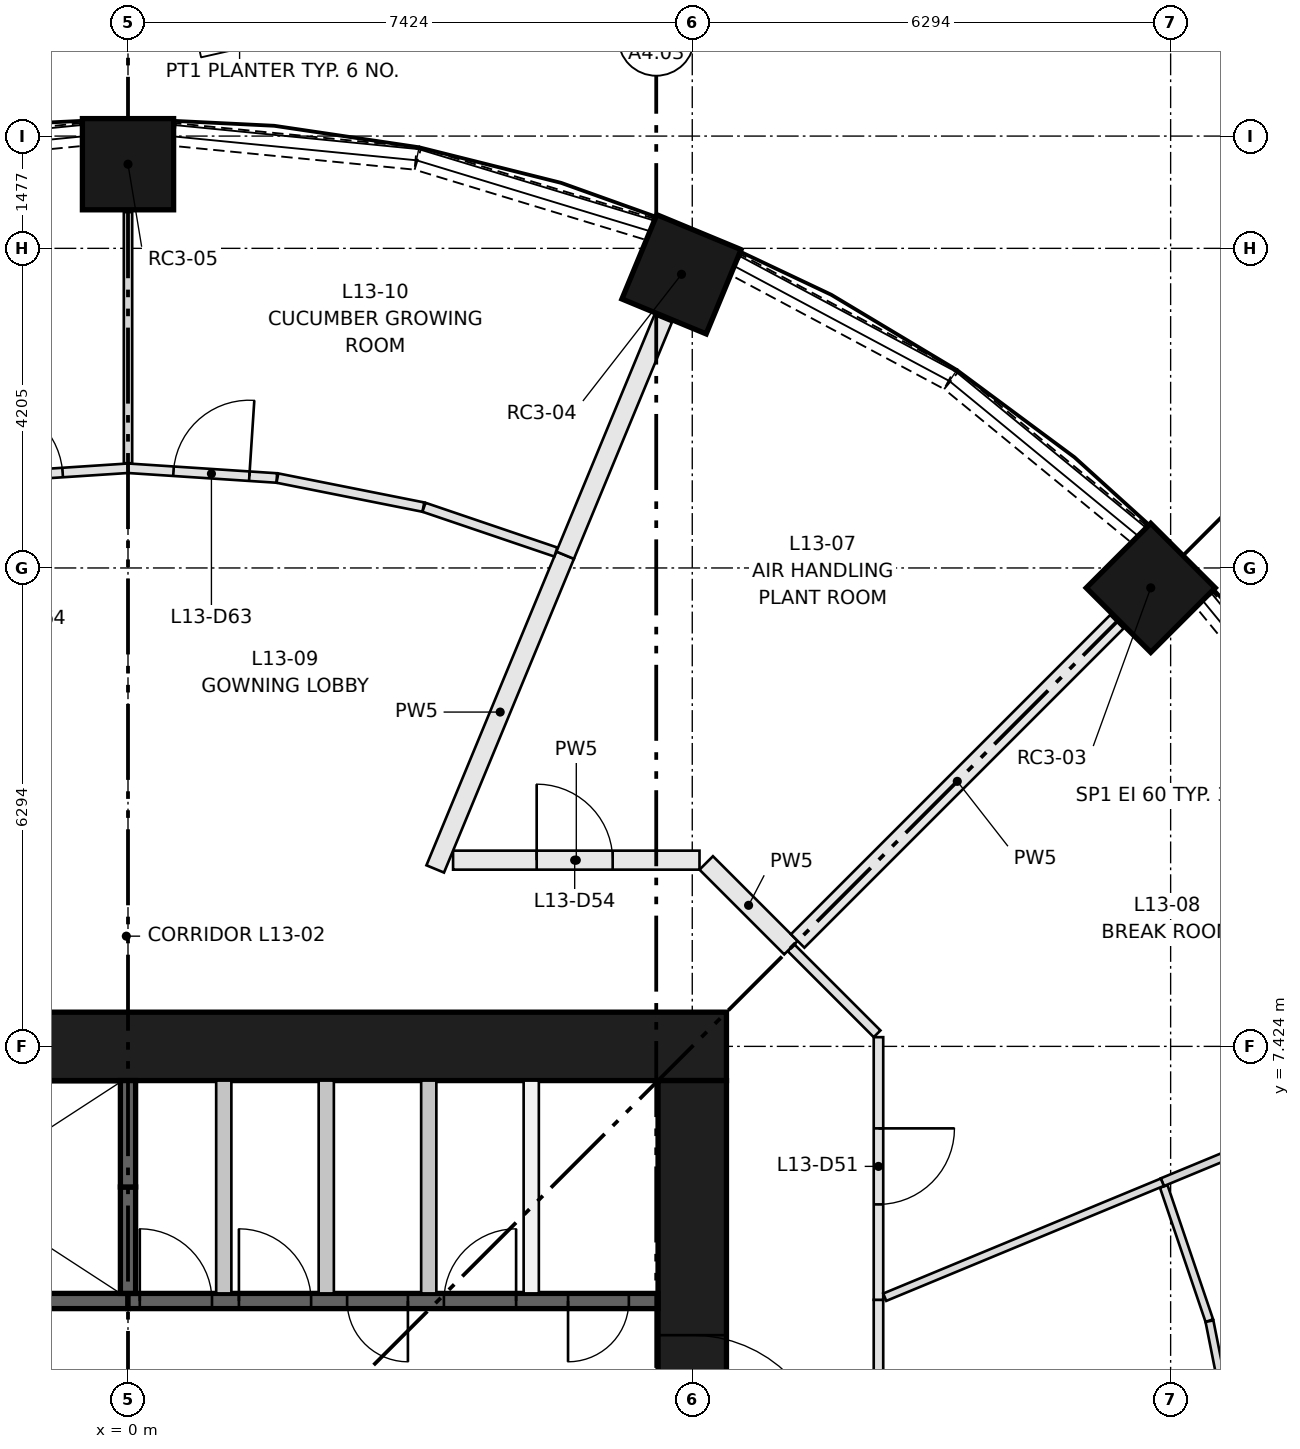
"""IFC4 building model, lengths in metres.
Left out: names, types, materials, properties, quantities, classifications, styles, units other than length and angle.
Written with IfcOpenShell. Run it as: python <this file> out.ifc"""

import sys

from ifc_helpers import new_model, si_unit, direction, frame, frame_2d, origin, origin_2d, place, context, subcontext, project, spatial, rectangle, extrude, element, fill, save


model = new_model("IFC4")
c1 = context("Model", 3, precision=1e-05, world=origin(), true_north=direction((0.0, 1.0)))
c2 = subcontext(c1, "Body", "Model", "MODEL_VIEW")
j1 = project(units=[si_unit("LENGTHUNIT", "METRE"), si_unit("PLANEANGLEUNIT", "RADIAN")], contexts=[c1])
p1 = place(None, origin())
s1 = spatial("IfcSite", under=j1, at=p1, CompositionType="ELEMENT")
p2 = place(p1, origin())
s2 = spatial("IfcBuilding", under=s1, at=p2, CompositionType="ELEMENT")
p3 = place(p2, frame((0.0, 0.0, 51.75)))
s3 = spatial("IfcBuildingStorey", under=s2, at=p3, CompositionType="ELEMENT", Elevation=51.75)
for number, where, z_axis, x_axis in (
    (1, (13.456, 13.456, 0.0), (0.0, 0.0, 1.0), (0.707, 0.707, 0.0)),
    (2, (7.282, 17.582, 0.0), (0.0, 0.0, 1.0), (0.383, 0.924, 0.0)),
    (3, (0.0, 19.03, 0.0), (0.0, 0.0, 1.0), (0.0, 1.0, 0.0)),
):
    element("IfcColumn", number, at=place(p3, frame(where, z_axis=z_axis, x_axis=x_axis)), inside=s3, PredefinedType="COLUMN", context=c2, shape_type="SweptSolid", body=[
        extrude(rectangle(XDim=1.2, YDim=1.2, at=origin_2d()), origin(), (0.0, 0.0, 1.0), 3.65),
    ])
p4 = place(p3, frame((-7.874, 7.424, 0.0), z_axis=(0.0, 0.0, 1.0), x_axis=(1.0, 0.0, 0.0)))
e4 = element("IfcWall", 4, at=p4, inside=s3, PredefinedType="SHEAR", context=c2, shape_type="SweptSolid", body=[
    extrude(rectangle(XDim=15.748, YDim=0.9, at=frame_2d((7.874, 0.0))), origin(), (0.0, 0.0, 1.0), 3.65),
])
p5 = place(p3, frame((7.424, -6.974, 0.0), z_axis=(0.0, 0.0, 1.0), x_axis=(0.0, 1.0, 0.0)))
e5 = element("IfcWall", 5, at=p5, inside=s3, PredefinedType="SHEAR", context=c2, shape_type="SweptSolid", body=[
    extrude(rectangle(XDim=13.948, YDim=0.9, at=frame_2d((6.974, 0.0))), origin(), (0.0, 0.0, 1.0), 3.65),
])
p6 = place(p5, frame((6.474, 0.0, 0.0)))
e6 = element("IfcOpeningElement", 6, at=p6, cuts=e5, PredefinedType="OPENING", context=c2, shape_type="SweptSolid", body=[
    extrude(rectangle(XDim=1.0, YDim=2.1, at=frame_2d((0.5, 1.05))), frame((0.0, 0.46, 0.0), z_axis=(0.0, -1.0, 0.0), x_axis=(1.0, 0.0, 0.0)), (0.0, 0.0, 1.0), 0.92),
])
p7 = place(p5, frame((3.35, 0.0, 0.0)))
e7 = element("IfcOpeningElement", 7, at=p7, cuts=e5, PredefinedType="OPENING", context=c2, shape_type="SweptSolid", body=[
    extrude(rectangle(XDim=1.8, YDim=2.1, at=frame_2d((0.9, 1.05))), frame((0.0, 0.46, 0.0), z_axis=(0.0, -1.0, 0.0), x_axis=(1.0, 0.0, 0.0)), (0.0, 0.0, 1.0), 0.92),
])
p8 = place(p5, frame((8.799, 0.0, 0.0)))
e8 = element("IfcOpeningElement", 8, at=p8, cuts=e5, PredefinedType="OPENING", context=c2, shape_type="SweptSolid", body=[
    extrude(rectangle(XDim=1.8, YDim=2.1, at=frame_2d((0.9, 1.05))), frame((0.0, 0.46, 0.0), z_axis=(0.0, -1.0, 0.0), x_axis=(1.0, 0.0, 0.0)), (0.0, 0.0, 1.0), 0.92),
])
p9 = place(p3, frame((-6.974, 4.074, 0.0), z_axis=(0.0, 0.0, 1.0), x_axis=(1.0, 0.0, 0.0)))
e9 = element("IfcWall", 9, at=p9, inside=s3, PredefinedType="SHEAR", context=c2, shape_type="SweptSolid", body=[
    extrude(rectangle(XDim=6.974, YDim=0.2, at=frame_2d((3.487, 0.0))), origin(), (0.0, 0.0, 1.0), 3.3),
])
p10 = place(p3, frame((0.0, 4.074, 0.0), z_axis=(0.0, 0.0, 1.0), x_axis=(1.0, 0.0, 0.0)))
e10 = element("IfcWall", 10, at=p10, inside=s3, PredefinedType="SHEAR", context=c2, shape_type="SweptSolid", body=[
    extrude(rectangle(XDim=6.974, YDim=0.2, at=frame_2d((3.487, 0.0))), origin(), (0.0, 0.0, 1.0), 3.3),
])
p11 = place(p10, frame((0.155, 0.0, 0.0)))
e11 = element("IfcOpeningElement", 11, at=p11, cuts=e10, PredefinedType="OPENING", context=c2, shape_type="SweptSolid", body=[
    extrude(rectangle(XDim=0.95, YDim=2.1, at=frame_2d((0.475, 1.05))), frame((0.0, 0.11, 0.0), z_axis=(0.0, -1.0, 0.0), x_axis=(1.0, 0.0, 0.0)), (0.0, 0.0, 1.0), 0.22),
])
p12 = place(p10, frame((1.459, 0.0, 0.0)))
e12 = element("IfcOpeningElement", 12, at=p12, cuts=e10, PredefinedType="OPENING", context=c2, shape_type="SweptSolid", body=[
    extrude(rectangle(XDim=0.95, YDim=2.1, at=frame_2d((0.475, 1.05))), frame((0.0, 0.11, 0.0), z_axis=(0.0, -1.0, 0.0), x_axis=(1.0, 0.0, 0.0)), (0.0, 0.0, 1.0), 0.22),
])
p13 = place(p10, frame((2.883, 0.0, 0.0)))
e13 = element("IfcOpeningElement", 13, at=p13, cuts=e10, PredefinedType="OPENING", context=c2, shape_type="SweptSolid", body=[
    extrude(rectangle(XDim=0.8, YDim=2.1, at=frame_2d((0.4, 1.05))), frame((0.0, 0.11, 0.0), z_axis=(0.0, -1.0, 0.0), x_axis=(1.0, 0.0, 0.0)), (0.0, 0.0, 1.0), 0.22),
])
p14 = place(p10, frame((4.156, 0.0, 0.0)))
e14 = element("IfcOpeningElement", 14, at=p14, cuts=e10, PredefinedType="OPENING", context=c2, shape_type="SweptSolid", body=[
    extrude(rectangle(XDim=0.95, YDim=2.1, at=frame_2d((0.475, 1.05))), frame((0.0, 0.11, 0.0), z_axis=(0.0, -1.0, 0.0), x_axis=(1.0, 0.0, 0.0)), (0.0, 0.0, 1.0), 0.22),
])
p15 = place(p10, frame((5.79, 0.0, 0.0)))
e15 = element("IfcOpeningElement", 15, at=p15, cuts=e10, PredefinedType="OPENING", context=c2, shape_type="SweptSolid", body=[
    extrude(rectangle(XDim=0.8, YDim=2.1, at=frame_2d((0.4, 1.05))), frame((0.0, 0.11, 0.0), z_axis=(0.0, -1.0, 0.0), x_axis=(1.0, 0.0, 0.0)), (0.0, 0.0, 1.0), 0.22),
])
p16 = place(p3, frame((0.0, 4.174, 0.0), z_axis=(0.0, 0.0, 1.0), x_axis=(0.0, 1.0, 0.0)))
e16 = element("IfcWall", 16, at=p16, inside=s3, PredefinedType="SHEAR", context=c2, shape_type="SweptSolid", body=[
    extrude(rectangle(XDim=1.4, YDim=0.2, at=frame_2d((0.7, 0.0))), origin(), (0.0, 0.0, 1.0), 3.3),
])
p17 = place(p3, frame((0.0, 5.574, 0.0), z_axis=(0.0, 0.0, 1.0), x_axis=(0.0, 1.0, 0.0)))
e17 = element("IfcWall", 17, at=p17, inside=s3, PredefinedType="SHEAR", context=c2, shape_type="SweptSolid", body=[
    extrude(rectangle(XDim=1.4, YDim=0.2, at=frame_2d((0.7, 0.0))), origin(), (0.0, 0.0, 1.0), 3.3),
])
for number, where, z_axis, x_axis in (
    (18, (1.26, 4.174, 0.0), (0.0, 0.0, 1.0), (0.0, 1.0, 0.0)),
    (19, (2.609, 4.174, 0.0), (0.0, 0.0, 1.0), (0.0, 1.0, 0.0)),
    (20, (3.957, 4.174, 0.0), (0.0, 0.0, 1.0), (0.0, 1.0, 0.0)),
    (21, (5.305, 4.174, 0.0), (0.0, 0.0, 1.0), (0.0, 1.0, 0.0)),
):
    element("IfcWall", number, at=place(p3, frame(where, z_axis=z_axis, x_axis=x_axis)), inside=s3, PredefinedType="PARTITIONING", context=c2, shape_type="SweptSolid", body=[
        extrude(rectangle(XDim=2.8, YDim=0.2, at=frame_2d((1.4, 0.0))), origin(), (0.0, 0.0, 1.0), 3.3),
    ])
for number, where, z_axis, x_axis in (
    (22, (16.188, 10.833, 0.0), (0.0, 0.0, 1.0), (-0.634, 0.773, 0.0)),
    (23, (13.298, 14.166, 0.0), (0.0, 0.0, 1.0), (-0.773, 0.634, 0.0)),
):
    element("IfcWall", number, at=place(p3, frame(where, z_axis=z_axis, x_axis=x_axis)), inside=s3, PredefinedType="SOLIDWALL", context=c2, shape_type="SweptSolid", body=[
        extrude(rectangle(XDim=3.188, YDim=0.3, at=frame_2d((1.594, 0.0))), origin(), (0.0, 0.0, 1.0), 0.9),
    ])
p18 = place(p3, frame((10.809, 16.204, 0.0), z_axis=(0.0, 0.0, 1.0), x_axis=(-0.881994263934, 0.471260138764, 0.0)))
e24 = element("IfcWall", 24, at=p18, inside=s3, PredefinedType="SOLIDWALL", context=c2, shape_type="SweptSolid", body=[
    extrude(rectangle(XDim=3.187, YDim=0.3, at=frame_2d((1.593, 0.0))), origin(), (0.0, 0.0, 1.0), 0.9),
])
p19 = place(p3, frame((6.865, 18.175, 0.0), z_axis=(0.0, 0.0, 1.0), x_axis=(-0.956849017819, 0.290585541792, 0.0)))
e25 = element("IfcWall", 25, at=p19, inside=s3, PredefinedType="SOLIDWALL", context=c2, shape_type="SweptSolid", body=[
    extrude(rectangle(XDim=3.188, YDim=0.3, at=frame_2d((1.594, 0.0))), origin(), (0.0, 0.0, 1.0), 0.9),
])
for number, where, z_axis, x_axis in (
    (26, (3.785, 19.107, 0.0), (0.0, 0.0, 1.0), (-0.995, 0.098, 0.0)),
    (27, (-0.613, 19.419, 0.0), (0.0, 0.0, 1.0), (-0.995, -0.098, 0.0)),
):
    element("IfcWall", number, at=place(p3, frame(where, z_axis=z_axis, x_axis=x_axis)), inside=s3, PredefinedType="SOLIDWALL", context=c2, shape_type="SweptSolid", body=[
        extrude(rectangle(XDim=3.188, YDim=0.3, at=frame_2d((1.594, 0.0))), origin(), (0.0, 0.0, 1.0), 0.9),
    ])
p20 = place(p3, frame((9.874, 4.09, 0.0), z_axis=(0.0, 0.0, 1.0), x_axis=(0.0, -1.0, 0.0)))
e28 = element("IfcWall", 28, at=p20, inside=s3, PredefinedType="PARTITIONING", context=c2, shape_type="SweptSolid", body=[
    extrude(rectangle(XDim=4.09, YDim=0.125, at=frame_2d((2.045, 0.0))), origin(), (0.0, 0.0, 1.0), 3.3),
])
p21 = place(p20, frame((1.5, 0.0, 0.0)))
e29 = element("IfcOpeningElement", 29, at=p21, cuts=e28, PredefinedType="OPENING", context=c2, shape_type="SweptSolid", body=[
    extrude(rectangle(XDim=1.0, YDim=2.1, at=frame_2d((0.5, 1.05))), frame((0.0, 0.073, 0.0), z_axis=(0.0, -1.0, 0.0), x_axis=(1.0, 0.0, 0.0)), (0.0, 0.0, 1.0), 0.145),
])
p22 = place(p3, frame((8.722, 8.722, 0.0), z_axis=(0.0, 0.0, 1.0), x_axis=(0.70718294931, -0.707030604857, 0.0)))
e30 = element("IfcWall", 30, at=p22, inside=s3, PredefinedType="PARTITIONING", context=c2, shape_type="SweptSolid", body=[
    extrude(rectangle(XDim=1.603, YDim=0.125, at=frame_2d((0.801, 0.0))), origin(), (0.0, 0.0, 1.0), 3.3),
])
p23 = place(p3, frame((9.874, 7.545, 0.0), z_axis=(0.0, 0.0, 1.0), x_axis=(0.0, -1.0, 0.0)))
e31 = element("IfcWall", 31, at=p23, inside=s3, PredefinedType="PARTITIONING", context=c2, shape_type="SweptSolid", body=[
    extrude(rectangle(XDim=3.455, YDim=0.125, at=frame_2d((1.728, 0.0))), origin(), (0.0, 0.0, 1.0), 3.3),
])
p24 = place(p23, frame((1.2, 0.0, 0.0)))
e32 = element("IfcOpeningElement", 32, at=p24, cuts=e31, PredefinedType="OPENING", context=c2, shape_type="SweptSolid", body=[
    extrude(rectangle(XDim=1.0, YDim=2.1, at=frame_2d((0.5, 1.05))), frame((0.0, 0.073, 0.0), z_axis=(0.0, -1.0, 0.0), x_axis=(1.0, 0.0, 0.0)), (0.0, 0.0, 1.0), 0.145),
])
p25 = place(p3, frame((4.277, 9.874, 0.0), z_axis=(0.0, 0.0, 1.0), x_axis=(1.0, 0.0, 0.0)))
e33 = element("IfcWall", 33, at=p25, inside=s3, PredefinedType="PARTITIONING", context=c2, shape_type="SweptSolid", body=[
    extrude(rectangle(XDim=3.242, YDim=0.25, at=frame_2d((1.621, 0.0))), origin(), (0.0, 0.0, 1.0), 3.3),
])
p26 = place(p25, frame((1.1, 0.0, 0.0)))
e34 = element("IfcOpeningElement", 34, at=p26, cuts=e33, PredefinedType="OPENING", context=c2, shape_type="SweptSolid", body=[
    extrude(rectangle(XDim=1.0, YDim=2.1, at=frame_2d((0.5, 1.05))), frame((0.0, 0.135, 0.0), z_axis=(0.0, -1.0, 0.0), x_axis=(1.0, 0.0, 0.0)), (0.0, 0.0, 1.0), 0.27),
])
p27 = place(p3, frame((7.608, 9.837, 0.0), z_axis=(0.0, 0.0, 1.0), x_axis=(0.707029353672, -0.707184200224, 0.0)))
e35 = element("IfcWall", 35, at=p27, inside=s3, PredefinedType="PARTITIONING", context=c2, shape_type="SweptSolid", body=[
    extrude(rectangle(XDim=1.577, YDim=0.25, at=frame_2d((0.788, 0.0))), origin(), (0.0, 0.0, 1.0), 3.3),
])
p28 = place(p3, frame((14.227, 3.816, 0.0), z_axis=(0.0, 0.0, 1.0), x_axis=(-0.321447308071, 0.946927467198, 0.0)))
e36 = element("IfcWall", 36, at=p28, inside=s3, PredefinedType="PARTITIONING", context=c2, shape_type="SweptSolid", body=[
    extrude(rectangle(XDim=1.865, YDim=0.105, at=frame_2d((0.932, 0.0))), origin(), (0.0, 0.0, 1.0), 3.3),
])
p29 = place(p3, frame((14.603, 1.926, 0.0), z_axis=(0.0, 0.0, 1.0), x_axis=(-0.195064501273, 0.980790416115, 0.0)))
e37 = element("IfcWall", 37, at=p29, inside=s3, PredefinedType="PARTITIONING", context=c2, shape_type="SweptSolid", body=[
    extrude(rectangle(XDim=1.92, YDim=0.105, at=frame_2d((0.96, 0.0))), origin(), (0.0, 0.0, 1.0), 3.3),
])
p30 = place(p3, frame((13.609, 5.637, 0.0), z_axis=(0.0, 0.0, 1.0), x_axis=(0.923870076355, 0.382706260748, 0.0)))
e38 = element("IfcWall", 38, at=p30, inside=s3, PredefinedType="PARTITIONING", context=c2, shape_type="SweptSolid", body=[
    extrude(rectangle(XDim=3.67, YDim=0.11, at=frame_2d((1.835, 0.0))), origin(), (0.0, 0.0, 1.0), 3.3),
])
p31 = place(p3, frame((9.957, 4.124, 0.0), z_axis=(0.0, 0.0, 1.0), x_axis=(0.923862514877, 0.382724513985, 0.0)))
e39 = element("IfcWall", 39, at=p31, inside=s3, PredefinedType="PARTITIONING", context=c2, shape_type="SweptSolid", body=[
    extrude(rectangle(XDim=3.953, YDim=0.105, at=frame_2d((1.977, 0.0))), origin(), (0.0, 0.0, 1.0), 3.3),
])
p32 = place(p3, frame((13.011, 13.011, 0.0), z_axis=(0.0, 0.0, 1.0), x_axis=(-0.707106781187, -0.707106781187, 0.0)))
e40 = element("IfcWall", 40, at=p32, inside=s3, PredefinedType="PARTITIONING", context=c2, shape_type="SweptSolid", body=[
    extrude(rectangle(XDim=5.94, YDim=0.25, at=frame_2d((2.97, 0.0))), origin(), (0.0, 0.0, 1.0), 3.3),
])
p33 = place(p3, frame((4.042, 9.759, 0.0), z_axis=(0.0, 0.0, 1.0), x_axis=(0.382697682956, 0.923873629595, 0.0)))
e41 = element("IfcWall", 41, at=p33, inside=s3, PredefinedType="PARTITIONING", context=c2, shape_type="SweptSolid", body=[
    extrude(rectangle(XDim=4.468, YDim=0.25, at=frame_2d((2.234, 0.0))), origin(), (0.0, 0.0, 1.0), 3.3),
])
p34 = place(p3, frame((5.752, 13.886, 0.0), z_axis=(0.0, 0.0, 1.0), x_axis=(0.382716478617, 0.923865843613, 0.0)))
e42 = element("IfcWall", 42, at=p34, inside=s3, PredefinedType="PARTITIONING", context=c2, shape_type="SweptSolid", body=[
    extrude(rectangle(XDim=3.37, YDim=0.25, at=frame_2d((1.685, 0.0))), origin(), (0.0, 0.0, 1.0), 3.3),
])
p35 = place(p3, frame((0.0, 15.03, 0.0), z_axis=(0.0, 0.0, 1.0), x_axis=(0.997855616904, -0.065453554619, 0.0)))
e43 = element("IfcWall", 43, at=p35, inside=s3, PredefinedType="PARTITIONING", context=c2, shape_type="SweptSolid", body=[
    extrude(rectangle(XDim=1.962, YDim=0.125, at=frame_2d((0.981, 0.0))), origin(), (0.0, 0.0, 1.0), 3.3),
])
p36 = place(p35, frame((0.6, 0.0, 0.0)))
e44 = element("IfcOpeningElement", 44, at=p36, cuts=e43, PredefinedType="OPENING", context=c2, shape_type="SweptSolid", body=[
    extrude(rectangle(XDim=1.0, YDim=2.1, at=frame_2d((0.5, 1.05))), frame((0.0, 0.073, 0.0), z_axis=(0.0, -1.0, 0.0), x_axis=(1.0, 0.0, 0.0)), (0.0, 0.0, 1.0), 0.145),
])
p37 = place(p3, frame((1.966, 14.901, 0.0), z_axis=(0.0, 0.0, 1.0), x_axis=(0.980795915473, -0.19503684829, 0.0)))
e45 = element("IfcWall", 45, at=p37, inside=s3, PredefinedType="PARTITIONING", context=c2, shape_type="SweptSolid", body=[
    extrude(rectangle(XDim=1.958, YDim=0.125, at=frame_2d((0.979, 0.0))), origin(), (0.0, 0.0, 1.0), 3.3),
])
p38 = place(p3, frame((3.894, 14.517, 0.0), z_axis=(0.0, 0.0, 1.0), x_axis=(0.946909907848, -0.321499030201, 0.0)))
e46 = element("IfcWall", 46, at=p38, inside=s3, PredefinedType="PARTITIONING", context=c2, shape_type="SweptSolid", body=[
    extrude(rectangle(XDim=1.832, YDim=0.125, at=frame_2d((0.916, 0.0))), origin(), (0.0, 0.0, 1.0), 3.3),
])
p39 = place(p3, frame((0.0, 15.096, 0.0), z_axis=(0.0, 0.0, 1.0), x_axis=(0.0, 1.0, 0.0)))
e47 = element("IfcWall", 47, at=p39, inside=s3, PredefinedType="PARTITIONING", context=c2, shape_type="SweptSolid", body=[
    extrude(rectangle(XDim=3.304, YDim=0.11, at=frame_2d((1.652, 0.0))), origin(), (0.0, 0.0, 1.0), 3.3),
])
p40 = place(p3, frame((-1.958, 14.902, 0.0), z_axis=(0.0, 0.0, 1.0), x_axis=(0.997855616904, 0.065453554619, 0.0)))
e48 = element("IfcWall", 48, at=p40, inside=s3, PredefinedType="PARTITIONING", context=c2, shape_type="SweptSolid", body=[
    extrude(rectangle(XDim=1.962, YDim=0.125, at=frame_2d((0.981, 0.0))), origin(), (0.0, 0.0, 1.0), 3.3),
])
p41 = place(p40, frame((0.1, 0.0, 0.0)))
e49 = element("IfcOpeningElement", 49, at=p41, cuts=e48, PredefinedType="OPENING", context=c2, shape_type="SweptSolid", body=[
    extrude(rectangle(XDim=1.0, YDim=2.1, at=frame_2d((0.5, 1.05))), frame((0.0, 0.073, 0.0), z_axis=(0.0, -1.0, 0.0), x_axis=(1.0, 0.0, 0.0)), (0.0, 0.0, 1.0), 0.145),
])
p42 = place(p11, origin())
e50 = element("IfcDoor", 50, at=p42, inside=s3, OperationType="SINGLE_SWING_LEFT", PredefinedType="DOOR", context=c2, shape_type="SweptSolid", body=[
    extrude(rectangle(XDim=0.95, YDim=2.1, at=frame_2d((0.475, 1.05))), frame((0.0, 0.025, 0.0), z_axis=(0.0, -1.0, 0.0), x_axis=(1.0, 0.0, 0.0)), (0.0, 0.0, 1.0), 0.05),
])
fill(e11, e50)
p43 = place(p12, origin())
e51 = element("IfcDoor", 51, at=p43, inside=s3, OperationType="SINGLE_SWING_LEFT", PredefinedType="DOOR", context=c2, shape_type="SweptSolid", body=[
    extrude(rectangle(XDim=0.95, YDim=2.1, at=frame_2d((0.475, 1.05))), frame((0.0, 0.025, 0.0), z_axis=(0.0, -1.0, 0.0), x_axis=(1.0, 0.0, 0.0)), (0.0, 0.0, 1.0), 0.05),
])
fill(e12, e51)
p44 = place(p13, frame((0.8, 0.0, 0.0), z_axis=(0.0, 0.0, 1.0), x_axis=(-1.0, 0.0, 0.0)))
e52 = element("IfcDoor", 52, at=p44, inside=s3, OperationType="SINGLE_SWING_RIGHT", PredefinedType="DOOR", context=c2, shape_type="SweptSolid", body=[
    extrude(rectangle(XDim=0.8, YDim=2.1, at=frame_2d((0.4, 1.05))), frame((0.0, 0.025, 0.0), z_axis=(0.0, -1.0, 0.0), x_axis=(1.0, 0.0, 0.0)), (0.0, 0.0, 1.0), 0.05),
])
fill(e13, e52)
p45 = place(p14, origin())
e53 = element("IfcDoor", 53, at=p45, inside=s3, OperationType="SINGLE_SWING_RIGHT", PredefinedType="DOOR", context=c2, shape_type="SweptSolid", body=[
    extrude(rectangle(XDim=0.95, YDim=2.1, at=frame_2d((0.475, 1.05))), frame((0.0, 0.025, 0.0), z_axis=(0.0, -1.0, 0.0), x_axis=(1.0, 0.0, 0.0)), (0.0, 0.0, 1.0), 0.05),
])
fill(e14, e53)
p46 = place(p15, frame((0.8, 0.0, 0.0), z_axis=(0.0, 0.0, 1.0), x_axis=(-1.0, 0.0, 0.0)))
e54 = element("IfcDoor", 54, at=p46, inside=s3, OperationType="SINGLE_SWING_LEFT", PredefinedType="DOOR", context=c2, shape_type="SweptSolid", body=[
    extrude(rectangle(XDim=0.8, YDim=2.1, at=frame_2d((0.4, 1.05))), frame((0.0, 0.025, 0.0), z_axis=(0.0, -1.0, 0.0), x_axis=(1.0, 0.0, 0.0)), (0.0, 0.0, 1.0), 0.05),
])
fill(e15, e54)
p47 = place(p8, frame((1.8, 0.0, 0.0), z_axis=(0.0, 0.0, 1.0), x_axis=(-1.0, 0.0, 0.0)))
e55 = element("IfcDoor", 55, at=p47, inside=s3, OperationType="DOUBLE_DOOR_SINGLE_SWING", PredefinedType="DOOR", context=c2, shape_type="SweptSolid", body=[
    extrude(rectangle(XDim=1.8, YDim=2.1, at=frame_2d((0.9, 1.05))), frame((0.0, 0.025, 0.0), z_axis=(0.0, -1.0, 0.0), x_axis=(1.0, 0.0, 0.0)), (0.0, 0.0, 1.0), 0.05),
])
fill(e8, e55)
p48 = place(p24, origin())
e56 = element("IfcDoor", 56, at=p48, inside=s3, OperationType="SINGLE_SWING_LEFT", PredefinedType="DOOR", context=c2, shape_type="SweptSolid", body=[
    extrude(rectangle(XDim=1.0, YDim=2.1, at=frame_2d((0.5, 1.05))), frame((0.0, 0.025, 0.0), z_axis=(0.0, -1.0, 0.0), x_axis=(1.0, 0.0, 0.0)), (0.0, 0.0, 1.0), 0.05),
])
fill(e32, e56)
p49 = place(p26, origin())
e57 = element("IfcDoor", 57, at=p49, inside=s3, OperationType="SINGLE_SWING_LEFT", PredefinedType="DOOR", context=c2, shape_type="SweptSolid", body=[
    extrude(rectangle(XDim=1.0, YDim=2.1, at=frame_2d((0.5, 1.05))), frame((0.0, 0.025, 0.0), z_axis=(0.0, -1.0, 0.0), x_axis=(1.0, 0.0, 0.0)), (0.0, 0.0, 1.0), 0.05),
])
fill(e34, e57)
p50 = place(p36, origin())
e58 = element("IfcDoor", 58, at=p50, inside=s3, OperationType="SINGLE_SWING_RIGHT", PredefinedType="DOOR", context=c2, shape_type="SweptSolid", body=[
    extrude(rectangle(XDim=1.0, YDim=2.1, at=frame_2d((0.5, 1.05))), frame((0.0, 0.025, 0.0), z_axis=(0.0, -1.0, 0.0), x_axis=(1.0, 0.0, 0.0)), (0.0, 0.0, 1.0), 0.05),
])
fill(e44, e58)
p51 = place(p41, origin())
e59 = element("IfcDoor", 59, at=p51, inside=s3, OperationType="SINGLE_SWING_LEFT", PredefinedType="DOOR", context=c2, shape_type="SweptSolid", body=[
    extrude(rectangle(XDim=1.0, YDim=2.1, at=frame_2d((0.5, 1.05))), frame((0.0, 0.025, 0.0), z_axis=(0.0, -1.0, 0.0), x_axis=(1.0, 0.0, 0.0)), (0.0, 0.0, 1.0), 0.05),
])
fill(e49, e59)
save(model, sys.argv[1])
